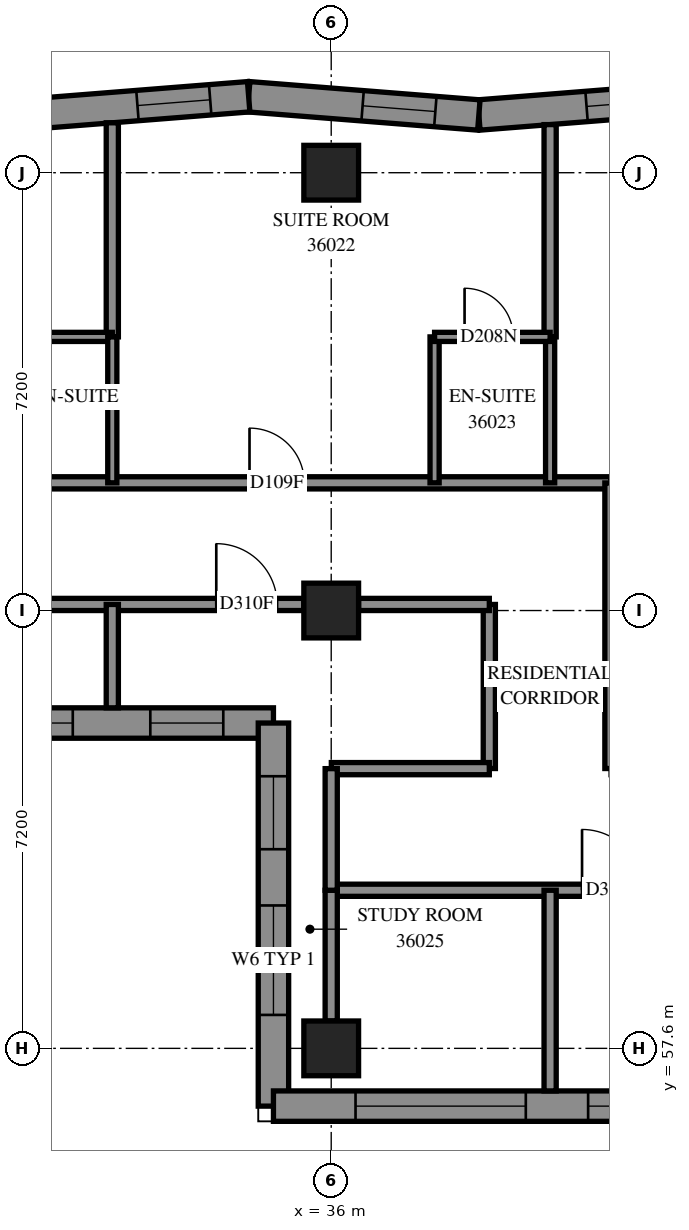
"""IFC4 building model, lengths in metres.
Left out: names, types, materials, properties, quantities, classifications, styles, units other than length and angle.
Written with IfcOpenShell. Run it as: python <this file> out.ifc"""

import sys

from ifc_helpers import new_model, si_unit, direction, frame, frame_2d, origin, origin_2d, place, context, subcontext, project, spatial, polyline, rectangle, outline, extrude, element, fill, save


model = new_model("IFC4")
c1 = context("Model", 3, precision=1e-05, world=origin(), true_north=direction((0.0, 1.0)))
c2 = subcontext(c1, "Body", "Model", "MODEL_VIEW")
j1 = project(units=[si_unit("LENGTHUNIT", "METRE"), si_unit("PLANEANGLEUNIT", "RADIAN")], contexts=[c1])
p1 = place(None, origin())
s1 = spatial("IfcSite", under=j1, at=p1, CompositionType="ELEMENT")
p2 = place(p1, origin())
s2 = spatial("IfcBuilding", under=s1, at=p2, CompositionType="ELEMENT")
p3 = place(p2, frame((0.0, 0.0, 135.4)))
s3 = spatial("IfcBuildingStorey", under=s2, at=p3, CompositionType="ELEMENT", Elevation=135.4)
for number, where, z_axis, x_axis in (
    (1, (36.0, 57.6, 0.0), (0.0, 0.0, 1.0), (1.0, 0.0, 0.0)),
    (2, (36.0, 64.8, 0.0), (0.0, 0.0, 1.0), (1.0, 0.0, 0.0)),
    (3, (36.0, 72.0, 0.0), (0.0, 0.0, 1.0), (1.0, 0.0, 0.0)),
):
    element("IfcColumn", number, at=place(p3, frame(where, z_axis=z_axis, x_axis=x_axis)), inside=s3, PredefinedType="COLUMN", context=c2, shape_type="SweptSolid", body=[
        extrude(rectangle(XDim=0.9, YDim=0.9, at=origin_2d()), origin(), (0.0, 0.0, 1.0), 3.1),
    ])
p4 = place(p3, frame((42.214, 73.249, 0.0), z_axis=(0.0, 0.0, 1.0), x_axis=(-0.9968746163, -0.078999996, 0.0)))
e4 = element("IfcWall", 4, at=p4, inside=s3, PredefinedType="SOLIDWALL", context=c2, shape_type="SweptSolid", body=[
    extrude(outline(polyline([(-0.02, -0.25), (3.778, -0.25), (3.817, 0.25), (0.02, 0.25), (-0.02, -0.25)])), origin(), (0.0, 0.0, 1.0), 3.1),
])
p5 = place(p4, frame((0.821, 0.0, 0.45)))
e5 = element("IfcOpeningElement", 5, at=p5, cuts=e4, PredefinedType="OPENING", context=c2, shape_type="SweptSolid", body=[
    extrude(rectangle(XDim=1.2, YDim=2.5, at=frame_2d((0.6, 1.25))), frame((0.0, 0.26, 0.0), z_axis=(0.0, -1.0, 0.0), x_axis=(1.0, 0.0, 0.0)), (0.0, 0.0, 1.0), 0.52),
])
p6 = place(p3, frame((38.428, 72.949, 0.0), z_axis=(0.0, 0.0, 1.0), x_axis=(-0.9968746163, 0.078999996, 0.0)))
e6 = element("IfcWall", 6, at=p6, inside=s3, PredefinedType="SOLIDWALL", context=c2, shape_type="SweptSolid", body=[
    extrude(outline(polyline([(0.02, -0.25), (3.817, -0.25), (3.778, 0.25), (-0.02, 0.25), (0.02, -0.25)])), origin(), (0.0, 0.0, 1.0), 3.1),
])
p7 = place(p6, frame((0.718, 0.0, 0.45)))
e7 = element("IfcOpeningElement", 7, at=p7, cuts=e6, PredefinedType="OPENING", context=c2, shape_type="SweptSolid", body=[
    extrude(rectangle(XDim=1.2, YDim=2.5, at=frame_2d((0.6, 1.25))), frame((0.0, 0.26, 0.0), z_axis=(0.0, -1.0, 0.0), x_axis=(1.0, 0.0, 0.0)), (0.0, 0.0, 1.0), 0.52),
])
p8 = place(p3, frame((34.642, 73.249, 0.0), z_axis=(0.0, 0.0, 1.0), x_axis=(-0.9968746163, -0.078999996, 0.0)))
e8 = element("IfcWall", 8, at=p8, inside=s3, PredefinedType="SOLIDWALL", context=c2, shape_type="SweptSolid", body=[
    extrude(outline(polyline([(-0.02, -0.25), (3.778, -0.25), (3.817, 0.25), (0.02, 0.25), (-0.02, -0.25)])), origin(), (0.0, 0.0, 1.0), 3.1),
])
p9 = place(p8, frame((0.635, 0.0, 0.45)))
e9 = element("IfcOpeningElement", 9, at=p9, cuts=e8, PredefinedType="OPENING", context=c2, shape_type="SweptSolid", body=[
    extrude(rectangle(XDim=1.2, YDim=2.5, at=frame_2d((0.6, 1.25))), frame((0.0, 0.26, 0.0), z_axis=(0.0, -1.0, 0.0), x_axis=(1.0, 0.0, 0.0)), (0.0, 0.0, 1.0), 0.52),
])
p10 = place(p3, frame((19.75, 62.95, 0.0), z_axis=(0.0, 0.0, 1.0), x_axis=(1.0, 0.0, 0.0)))
e10 = element("IfcWall", 10, at=p10, inside=s3, PredefinedType="SOLIDWALL", context=c2, shape_type="SweptSolid", body=[
    extrude(outline(polyline([(-0.25, -0.25), (15.05, -0.25), (15.55, 0.25), (0.25, 0.25), (-0.25, -0.25)])), origin(), (0.0, 0.0, 1.0), 3.1),
])
p11 = place(p10, frame((2.25, 0.0, 0.45)))
e11 = element("IfcOpeningElement", 11, at=p11, cuts=e10, PredefinedType="OPENING", context=c2, shape_type="SweptSolid", body=[
    extrude(rectangle(XDim=2.8, YDim=2.5, at=frame_2d((1.4, 1.25))), frame((0.0, 0.26, 0.0), z_axis=(0.0, -1.0, 0.0), x_axis=(1.0, 0.0, 0.0)), (0.0, 0.0, 1.0), 0.52),
])
p12 = place(p10, frame((5.85, 0.0, 0.45)))
e12 = element("IfcOpeningElement", 12, at=p12, cuts=e10, PredefinedType="OPENING", context=c2, shape_type="SweptSolid", body=[
    extrude(rectangle(XDim=2.8, YDim=2.5, at=frame_2d((1.4, 1.25))), frame((0.0, 0.26, 0.0), z_axis=(0.0, -1.0, 0.0), x_axis=(1.0, 0.0, 0.0)), (0.0, 0.0, 1.0), 0.52),
])
p13 = place(p10, frame((9.2, 0.0, 0.45)))
e13 = element("IfcOpeningElement", 13, at=p13, cuts=e10, PredefinedType="OPENING", context=c2, shape_type="SweptSolid", body=[
    extrude(rectangle(XDim=2.8, YDim=2.5, at=frame_2d((1.4, 1.25))), frame((0.0, 0.26, 0.0), z_axis=(0.0, -1.0, 0.0), x_axis=(1.0, 0.0, 0.0)), (0.0, 0.0, 1.0), 0.52),
])
p14 = place(p10, frame((0.55, 0.0, 0.45)))
e14 = element("IfcOpeningElement", 14, at=p14, cuts=e10, PredefinedType="OPENING", context=c2, shape_type="SweptSolid", body=[
    extrude(rectangle(XDim=1.2, YDim=2.5, at=frame_2d((0.6, 1.25))), frame((0.0, 0.26, 0.0), z_axis=(0.0, -1.0, 0.0), x_axis=(1.0, 0.0, 0.0)), (0.0, 0.0, 1.0), 0.52),
])
p15 = place(p10, frame((13.275, 0.0, 0.45)))
e15 = element("IfcOpeningElement", 15, at=p15, cuts=e10, PredefinedType="OPENING", context=c2, shape_type="SweptSolid", body=[
    extrude(rectangle(XDim=1.2, YDim=2.5, at=frame_2d((0.6, 1.25))), frame((0.0, 0.26, 0.0), z_axis=(0.0, -1.0, 0.0), x_axis=(1.0, 0.0, 0.0)), (0.0, 0.0, 1.0), 0.52),
])
p16 = place(p3, frame((35.05, 62.95, 0.0), z_axis=(0.0, 0.0, 1.0), x_axis=(0.0, -1.0, 0.0)))
e16 = element("IfcWall", 16, at=p16, inside=s3, PredefinedType="SOLIDWALL", context=c2, shape_type="SweptSolid", body=[
    extrude(outline(polyline([(0.25, -0.25), (6.55, -0.25), (6.05, 0.25), (-0.25, 0.25), (0.25, -0.25)])), origin(), (0.0, 0.0, 1.0), 3.1),
])
p17 = place(p16, frame((0.875, 0.0, 0.45)))
e17 = element("IfcOpeningElement", 17, at=p17, cuts=e16, PredefinedType="OPENING", context=c2, shape_type="SweptSolid", body=[
    extrude(rectangle(XDim=1.2, YDim=2.5, at=frame_2d((0.6, 1.25))), frame((0.0, 0.26, 0.0), z_axis=(0.0, -1.0, 0.0), x_axis=(1.0, 0.0, 0.0)), (0.0, 0.0, 1.0), 0.52),
])
p18 = place(p16, frame((3.0, 0.0, 0.7)))
e18 = element("IfcOpeningElement", 18, at=p18, cuts=e16, PredefinedType="OPENING", context=c2, shape_type="SweptSolid", body=[
    extrude(rectangle(XDim=1.8, YDim=2.2, at=frame_2d((0.9, 1.1))), frame((0.0, 0.26, 0.0), z_axis=(0.0, -1.0, 0.0), x_axis=(1.0, 0.0, 0.0)), (0.0, 0.0, 1.0), 0.52),
])
p19 = place(p3, frame((35.05, 56.65, 0.0), z_axis=(0.0, 0.0, 1.0), x_axis=(1.0, 0.0, 0.0)))
e19 = element("IfcWall", 19, at=p19, inside=s3, PredefinedType="SOLIDWALL", context=c2, shape_type="SweptSolid", body=[
    extrude(outline(polyline([(-0.25, -0.25), (6.95, -0.25), (7.45, 0.25), (0.25, 0.25), (-0.25, -0.25)])), origin(), (0.0, 0.0, 1.0), 3.1),
])
p20 = place(p19, frame((1.35, 0.0, 0.45)))
e20 = element("IfcOpeningElement", 20, at=p20, cuts=e19, PredefinedType="OPENING", context=c2, shape_type="SweptSolid", body=[
    extrude(rectangle(XDim=2.8, YDim=2.5, at=frame_2d((1.4, 1.25))), frame((0.0, 0.26, 0.0), z_axis=(0.0, -1.0, 0.0), x_axis=(1.0, 0.0, 0.0)), (0.0, 0.0, 1.0), 0.52),
])
p21 = place(p19, frame((5.175, 0.0, 0.45)))
e21 = element("IfcOpeningElement", 21, at=p21, cuts=e19, PredefinedType="OPENING", context=c2, shape_type="SweptSolid", body=[
    extrude(rectangle(XDim=1.2, YDim=2.5, at=frame_2d((0.6, 1.25))), frame((0.0, 0.26, 0.0), z_axis=(0.0, -1.0, 0.0), x_axis=(1.0, 0.0, 0.0)), (0.0, 0.0, 1.0), 0.52),
])
p22 = place(p3, frame((21.6, 66.9, 0.0), z_axis=(0.0, 0.0, 1.0), x_axis=(1.0, 0.0, 0.0)))
e22 = element("IfcWall", 22, at=p22, inside=s3, PredefinedType="PARTITIONING", context=c2, shape_type="SweptSolid", body=[
    extrude(rectangle(XDim=19.0, YDim=0.2, at=frame_2d((9.5, 0.0))), origin(), (0.0, 0.0, 1.0), 3.1),
])
p23 = place(p22, frame((2.3, 0.0, 0.0)))
e23 = element("IfcOpeningElement", 23, at=p23, cuts=e22, PredefinedType="OPENING", context=c2, shape_type="SweptSolid", body=[
    extrude(rectangle(XDim=0.9, YDim=2.1, at=frame_2d((0.45, 1.05))), frame((0.0, 0.11, 0.0), z_axis=(0.0, -1.0, 0.0), x_axis=(1.0, 0.0, 0.0)), (0.0, 0.0, 1.0), 0.22),
])
p24 = place(p22, frame((5.957, 0.0, 0.0)))
e24 = element("IfcOpeningElement", 24, at=p24, cuts=e22, PredefinedType="OPENING", context=c2, shape_type="SweptSolid", body=[
    extrude(rectangle(XDim=0.9, YDim=2.1, at=frame_2d((0.45, 1.05))), frame((0.0, 0.11, 0.0), z_axis=(0.0, -1.0, 0.0), x_axis=(1.0, 0.0, 0.0)), (0.0, 0.0, 1.0), 0.22),
])
p25 = place(p22, frame((13.057, 0.0, 0.0)))
e25 = element("IfcOpeningElement", 25, at=p25, cuts=e22, PredefinedType="OPENING", context=c2, shape_type="SweptSolid", body=[
    extrude(rectangle(XDim=0.9, YDim=2.1, at=frame_2d((0.45, 1.05))), frame((0.0, 0.11, 0.0), z_axis=(0.0, -1.0, 0.0), x_axis=(1.0, 0.0, 0.0)), (0.0, 0.0, 1.0), 0.22),
])
p26 = place(p3, frame((36.0, 60.2, 0.0), z_axis=(0.0, 0.0, 1.0), x_axis=(1.0, 0.0, 0.0)))
e26 = element("IfcWall", 26, at=p26, inside=s3, PredefinedType="PARTITIONING", context=c2, shape_type="SweptSolid", body=[
    extrude(rectangle(XDim=17.0, YDim=0.2, at=frame_2d((8.5, 0.0))), origin(), (0.0, 0.0, 1.0), 3.1),
])
p27 = place(p26, frame((15.805, 0.0, 0.0)))
e27 = element("IfcOpeningElement", 27, at=p27, cuts=e26, PredefinedType="OPENING", context=c2, shape_type="SweptSolid", body=[
    extrude(rectangle(XDim=1.0, YDim=2.1, at=frame_2d((0.5, 1.05))), frame((0.0, 0.11, 0.0), z_axis=(0.0, -1.0, 0.0), x_axis=(1.0, 0.0, 0.0)), (0.0, 0.0, 1.0), 0.22),
])
p28 = place(p26, frame((4.125, 0.0, 0.0)))
e28 = element("IfcOpeningElement", 28, at=p28, cuts=e26, PredefinedType="OPENING", context=c2, shape_type="SweptSolid", body=[
    extrude(rectangle(XDim=1.0, YDim=2.1, at=frame_2d((0.5, 1.05))), frame((0.0, 0.11, 0.0), z_axis=(0.0, -1.0, 0.0), x_axis=(1.0, 0.0, 0.0)), (0.0, 0.0, 1.0), 0.22),
])
p29 = place(p26, frame((7.55, 0.0, 0.0)))
e29 = element("IfcOpeningElement", 29, at=p29, cuts=e26, PredefinedType="OPENING", context=c2, shape_type="SweptSolid", body=[
    extrude(rectangle(XDim=0.9, YDim=2.1, at=frame_2d((0.45, 1.05))), frame((0.0, 0.11, 0.0), z_axis=(0.0, -1.0, 0.0), x_axis=(1.0, 0.0, 0.0)), (0.0, 0.0, 1.0), 0.22),
])
p30 = place(p26, frame((11.635, 0.0, 0.0)))
e30 = element("IfcOpeningElement", 30, at=p30, cuts=e26, PredefinedType="OPENING", context=c2, shape_type="SweptSolid", body=[
    extrude(rectangle(XDim=1.0, YDim=2.1, at=frame_2d((0.5, 1.05))), frame((0.0, 0.11, 0.0), z_axis=(0.0, -1.0, 0.0), x_axis=(1.0, 0.0, 0.0)), (0.0, 0.0, 1.0), 0.22),
])
p31 = place(p3, frame((29.25, 64.9, 0.0), z_axis=(0.0, 0.0, 1.0), x_axis=(1.0, 0.0, 0.0)))
e31 = element("IfcWall", 31, at=p31, inside=s3, PredefinedType="PARTITIONING", context=c2, shape_type="SweptSolid", body=[
    extrude(rectangle(XDim=6.3, YDim=0.2, at=frame_2d((3.15, 0.0))), origin(), (0.0, 0.0, 1.0), 2.6),
])
p32 = place(p31, frame((4.86, 0.0, 0.0)))
e32 = element("IfcOpeningElement", 32, at=p32, cuts=e31, PredefinedType="OPENING", context=c2, shape_type="SweptSolid", body=[
    extrude(rectangle(XDim=1.0, YDim=2.1, at=frame_2d((0.5, 1.05))), frame((0.0, 0.11, 0.0), z_axis=(0.0, -1.0, 0.0), x_axis=(1.0, 0.0, 0.0)), (0.0, 0.0, 1.0), 0.22),
])
p33 = place(p3, frame((40.6, 62.202, 0.0), z_axis=(0.0, 0.0, 1.0), x_axis=(0.0, 1.0, 0.0)))
e33 = element("IfcWall", 33, at=p33, inside=s3, PredefinedType="PARTITIONING", context=c2, shape_type="SweptSolid", body=[
    extrude(rectangle(XDim=4.696, YDim=0.2, at=frame_2d((2.348, 0.0))), origin(), (0.0, 0.0, 1.0), 3.1),
])
p34 = place(p3, frame((32.4, 69.3, 0.0), z_axis=(0.0, 0.0, 1.0), x_axis=(0.0, 1.0, 0.0)))
e34 = element("IfcWall", 34, at=p34, inside=s3, PredefinedType="PARTITIONING", context=c2, shape_type="SweptSolid", body=[
    extrude(rectangle(XDim=3.521, YDim=0.2, at=frame_2d((1.76, 0.0))), origin(), (0.0, 0.0, 1.0), 3.1),
])
p35 = place(p3, frame((39.6, 69.3, 0.0), z_axis=(0.0, 0.0, 1.0), x_axis=(0.0, 1.0, 0.0)))
e35 = element("IfcWall", 35, at=p35, inside=s3, PredefinedType="PARTITIONING", context=c2, shape_type="SweptSolid", body=[
    extrude(rectangle(XDim=3.491, YDim=0.2, at=frame_2d((1.746, 0.0))), origin(), (0.0, 0.0, 1.0), 3.1),
])
p36 = place(p3, frame((39.6, 56.9, 0.0), z_axis=(0.0, 0.0, 1.0), x_axis=(0.0, 1.0, 0.0)))
e36 = element("IfcWall", 36, at=p36, inside=s3, PredefinedType="PARTITIONING", context=c2, shape_type="SweptSolid", body=[
    extrude(rectangle(XDim=3.3, YDim=0.2, at=frame_2d((1.65, 0.0))), origin(), (0.0, 0.0, 1.0), 3.1),
])
p37 = place(p3, frame((29.2, 69.3, 0.0), z_axis=(0.0, 0.0, 1.0), x_axis=(1.0, 0.0, 0.0)))
e37 = element("IfcWall", 37, at=p37, inside=s3, PredefinedType="PARTITIONING", context=c2, shape_type="SweptSolid", body=[
    extrude(rectangle(XDim=3.2, YDim=0.15, at=frame_2d((1.6, 0.0))), origin(), (0.0, 0.0, 1.0), 3.1),
])
p38 = place(p37, frame((1.204, 0.0, 0.0)))
e38 = element("IfcOpeningElement", 38, at=p38, cuts=e37, PredefinedType="OPENING", context=c2, shape_type="SweptSolid", body=[
    extrude(rectangle(XDim=0.8, YDim=2.1, at=frame_2d((0.4, 1.05))), frame((0.0, 0.085, 0.0), z_axis=(0.0, -1.0, 0.0), x_axis=(1.0, 0.0, 0.0)), (0.0, 0.0, 1.0), 0.17),
])
p39 = place(p3, frame((38.6, 62.202, 0.0), z_axis=(0.0, 0.0, 1.0), x_axis=(0.0, 1.0, 0.0)))
e39 = element("IfcWall", 39, at=p39, inside=s3, PredefinedType="PARTITIONING", context=c2, shape_type="SweptSolid", body=[
    extrude(rectangle(XDim=2.698, YDim=0.2, at=frame_2d((1.349, 0.0))), origin(), (0.0, 0.0, 1.0), 3.1),
])
p40 = place(p3, frame((36.002, 62.2, 0.0), z_axis=(0.0, 0.0, 1.0), x_axis=(1.0, 0.0, 0.0)))
e40 = element("IfcWall", 40, at=p40, inside=s3, PredefinedType="PARTITIONING", context=c2, shape_type="SweptSolid", body=[
    extrude(rectangle(XDim=2.598, YDim=0.2, at=frame_2d((1.299, 0.0))), origin(), (0.0, 0.0, 1.0), 3.1),
])
for number, where, z_axis, x_axis in (
    (41, (32.4, 66.9, 0.0), (0.0, 0.0, 1.0), (0.0, 1.0, 0.0)),
    (42, (37.7, 66.9, 0.0), (0.0, 0.0, 1.0), (0.0, 1.0, 0.0)),
    (43, (39.6, 66.9, 0.0), (0.0, 0.0, 1.0), (0.0, 1.0, 0.0)),
):
    element("IfcWall", number, at=place(p3, frame(where, z_axis=z_axis, x_axis=x_axis)), inside=s3, PredefinedType="PARTITIONING", context=c2, shape_type="SweptSolid", body=[
        extrude(rectangle(XDim=2.4, YDim=0.15, at=frame_2d((1.2, 0.0))), origin(), (0.0, 0.0, 1.0), 3.1),
    ])
p41 = place(p3, frame((36.0, 58.05, 0.0), z_axis=(0.0, 0.0, 1.0), x_axis=(0.0, 1.0, 0.0)))
e44 = element("IfcWall", 44, at=p41, inside=s3, PredefinedType="PARTITIONING", context=c2, shape_type="SweptSolid", body=[
    extrude(rectangle(XDim=2.15, YDim=0.2, at=frame_2d((1.075, 0.0))), origin(), (0.0, 0.0, 1.0), 2.6),
])
p42 = place(p3, frame((36.45, 64.9, 0.0), z_axis=(0.0, 0.0, 1.0), x_axis=(1.0, 0.0, 0.0)))
e45 = element("IfcWall", 45, at=p42, inside=s3, PredefinedType="PARTITIONING", context=c2, shape_type="SweptSolid", body=[
    extrude(rectangle(XDim=2.15, YDim=0.2, at=frame_2d((1.075, 0.0))), origin(), (0.0, 0.0, 1.0), 3.1),
])
p43 = place(p3, frame((36.0, 60.2, 0.0), z_axis=(0.0, 0.0, 1.0), x_axis=(0.0, 1.0, 0.0)))
e46 = element("IfcWall", 46, at=p43, inside=s3, PredefinedType="PARTITIONING", context=c2, shape_type="SweptSolid", body=[
    extrude(rectangle(XDim=2.0, YDim=0.2, at=frame_2d((1.0, 0.0))), origin(), (0.0, 0.0, 1.0), 2.6),
])
p44 = place(p3, frame((37.7, 69.3, 0.0), z_axis=(0.0, 0.0, 1.0), x_axis=(1.0, 0.0, 0.0)))
e47 = element("IfcWall", 47, at=p44, inside=s3, PredefinedType="PARTITIONING", context=c2, shape_type="SweptSolid", body=[
    extrude(rectangle(XDim=1.9, YDim=0.15, at=frame_2d((0.95, 0.0))), origin(), (0.0, 0.0, 1.0), 3.1),
])
p45 = place(p44, frame((0.493, 0.0, 0.0)))
e48 = element("IfcOpeningElement", 48, at=p45, cuts=e47, PredefinedType="OPENING", context=c2, shape_type="SweptSolid", body=[
    extrude(rectangle(XDim=0.8, YDim=2.1, at=frame_2d((0.4, 1.05))), frame((0.0, 0.085, 0.0), z_axis=(0.0, -1.0, 0.0), x_axis=(1.0, 0.0, 0.0)), (0.0, 0.0, 1.0), 0.17),
])
p46 = place(p3, frame((32.4, 63.2, 0.0), z_axis=(0.0, 0.0, 1.0), x_axis=(0.0, 1.0, 0.0)))
e49 = element("IfcWall", 49, at=p46, inside=s3, PredefinedType="PARTITIONING", context=c2, shape_type="SweptSolid", body=[
    extrude(rectangle(XDim=1.7, YDim=0.2, at=frame_2d((0.85, 0.0))), origin(), (0.0, 0.0, 1.0), 3.1),
])
p47 = place(p5, origin())
e50 = element("IfcWindow", 50, at=p47, inside=s3, PartitioningType="SINGLE_PANEL", PredefinedType="WINDOW", context=c2, shape_type="SweptSolid", body=[
    extrude(rectangle(XDim=1.2, YDim=2.5, at=frame_2d((0.6, 1.25))), frame((0.0, 0.18, 0.0), z_axis=(0.0, -1.0, 0.0), x_axis=(1.0, 0.0, 0.0)), (0.0, 0.0, 1.0), 0.06),
])
fill(e5, e50)
p48 = place(p7, origin())
e51 = element("IfcWindow", 51, at=p48, inside=s3, PartitioningType="SINGLE_PANEL", PredefinedType="WINDOW", context=c2, shape_type="SweptSolid", body=[
    extrude(rectangle(XDim=1.2, YDim=2.5, at=frame_2d((0.6, 1.25))), frame((0.0, 0.18, 0.0), z_axis=(0.0, -1.0, 0.0), x_axis=(1.0, 0.0, 0.0)), (0.0, 0.0, 1.0), 0.06),
])
fill(e7, e51)
p49 = place(p9, origin())
e52 = element("IfcWindow", 52, at=p49, inside=s3, PartitioningType="SINGLE_PANEL", PredefinedType="WINDOW", context=c2, shape_type="SweptSolid", body=[
    extrude(rectangle(XDim=1.2, YDim=2.5, at=frame_2d((0.6, 1.25))), frame((0.0, 0.18, 0.0), z_axis=(0.0, -1.0, 0.0), x_axis=(1.0, 0.0, 0.0)), (0.0, 0.0, 1.0), 0.06),
])
fill(e9, e52)
p50 = place(p13, origin())
e53 = element("IfcWindow", 53, at=p50, inside=s3, PartitioningType="SINGLE_PANEL", PredefinedType="WINDOW", context=c2, shape_type="SweptSolid", body=[
    extrude(rectangle(XDim=2.8, YDim=2.5, at=frame_2d((1.4, 1.25))), frame((0.0, 0.18, 0.0), z_axis=(0.0, -1.0, 0.0), x_axis=(1.0, 0.0, 0.0)), (0.0, 0.0, 1.0), 0.06),
])
fill(e13, e53)
p51 = place(p15, origin())
e54 = element("IfcWindow", 54, at=p51, inside=s3, PartitioningType="SINGLE_PANEL", PredefinedType="WINDOW", context=c2, shape_type="SweptSolid", body=[
    extrude(rectangle(XDim=1.2, YDim=2.5, at=frame_2d((0.6, 1.25))), frame((0.0, 0.18, 0.0), z_axis=(0.0, -1.0, 0.0), x_axis=(1.0, 0.0, 0.0)), (0.0, 0.0, 1.0), 0.06),
])
fill(e15, e54)
p52 = place(p17, origin())
e55 = element("IfcWindow", 55, at=p52, inside=s3, PartitioningType="SINGLE_PANEL", PredefinedType="WINDOW", context=c2, shape_type="SweptSolid", body=[
    extrude(rectangle(XDim=1.2, YDim=2.5, at=frame_2d((0.6, 1.25))), frame((0.0, 0.18, 0.0), z_axis=(0.0, -1.0, 0.0), x_axis=(1.0, 0.0, 0.0)), (0.0, 0.0, 1.0), 0.06),
])
fill(e17, e55)
p53 = place(p20, origin())
e56 = element("IfcWindow", 56, at=p53, inside=s3, PartitioningType="SINGLE_PANEL", PredefinedType="WINDOW", context=c2, shape_type="SweptSolid", body=[
    extrude(rectangle(XDim=2.8, YDim=2.5, at=frame_2d((1.4, 1.25))), frame((0.0, 0.18, 0.0), z_axis=(0.0, -1.0, 0.0), x_axis=(1.0, 0.0, 0.0)), (0.0, 0.0, 1.0), 0.06),
])
fill(e20, e56)
p54 = place(p21, origin())
e57 = element("IfcWindow", 57, at=p54, inside=s3, PartitioningType="SINGLE_PANEL", PredefinedType="WINDOW", context=c2, shape_type="SweptSolid", body=[
    extrude(rectangle(XDim=1.2, YDim=2.5, at=frame_2d((0.6, 1.25))), frame((0.0, 0.18, 0.0), z_axis=(0.0, -1.0, 0.0), x_axis=(1.0, 0.0, 0.0)), (0.0, 0.0, 1.0), 0.06),
])
fill(e21, e57)
p55 = place(p25, origin())
e58 = element("IfcDoor", 58, at=p55, inside=s3, OperationType="SINGLE_SWING_LEFT", PredefinedType="DOOR", context=c2, shape_type="SweptSolid", body=[
    extrude(rectangle(XDim=0.9, YDim=2.1, at=frame_2d((0.45, 1.05))), frame((0.0, 0.025, 0.0), z_axis=(0.0, -1.0, 0.0), x_axis=(1.0, 0.0, 0.0)), (0.0, 0.0, 1.0), 0.05),
])
fill(e25, e58)
p56 = place(p45, origin())
e59 = element("IfcDoor", 59, at=p56, inside=s3, OperationType="SINGLE_SWING_RIGHT", PredefinedType="DOOR", context=c2, shape_type="SweptSolid", body=[
    extrude(rectangle(XDim=0.8, YDim=2.1, at=frame_2d((0.4, 1.05))), frame((0.0, 0.025, 0.0), z_axis=(0.0, -1.0, 0.0), x_axis=(1.0, 0.0, 0.0)), (0.0, 0.0, 1.0), 0.05),
])
fill(e48, e59)
p57 = place(p32, origin())
e60 = element("IfcDoor", 60, at=p57, inside=s3, OperationType="SINGLE_SWING_RIGHT", PredefinedType="DOOR", context=c2, shape_type="SweptSolid", body=[
    extrude(rectangle(XDim=1.0, YDim=2.1, at=frame_2d((0.5, 1.05))), frame((0.0, 0.025, 0.0), z_axis=(0.0, -1.0, 0.0), x_axis=(1.0, 0.0, 0.0)), (0.0, 0.0, 1.0), 0.05),
])
fill(e32, e60)
p58 = place(p28, origin())
e61 = element("IfcDoor", 61, at=p58, inside=s3, OperationType="SINGLE_SWING_RIGHT", PredefinedType="DOOR", context=c2, shape_type="SweptSolid", body=[
    extrude(rectangle(XDim=1.0, YDim=2.1, at=frame_2d((0.5, 1.05))), frame((0.0, 0.025, 0.0), z_axis=(0.0, -1.0, 0.0), x_axis=(1.0, 0.0, 0.0)), (0.0, 0.0, 1.0), 0.05),
])
fill(e28, e61)
p59 = place(p18, origin())
e62 = element("IfcWindow", 62, at=p59, inside=s3, PartitioningType="SINGLE_PANEL", PredefinedType="WINDOW", context=c2, shape_type="SweptSolid", body=[
    extrude(rectangle(XDim=1.8, YDim=2.2, at=frame_2d((0.9, 1.1))), frame((0.0, 0.18, 0.0), z_axis=(0.0, -1.0, 0.0), x_axis=(1.0, 0.0, 0.0)), (0.0, 0.0, 1.0), 0.06),
])
fill(e18, e62)
save(model, sys.argv[1])
